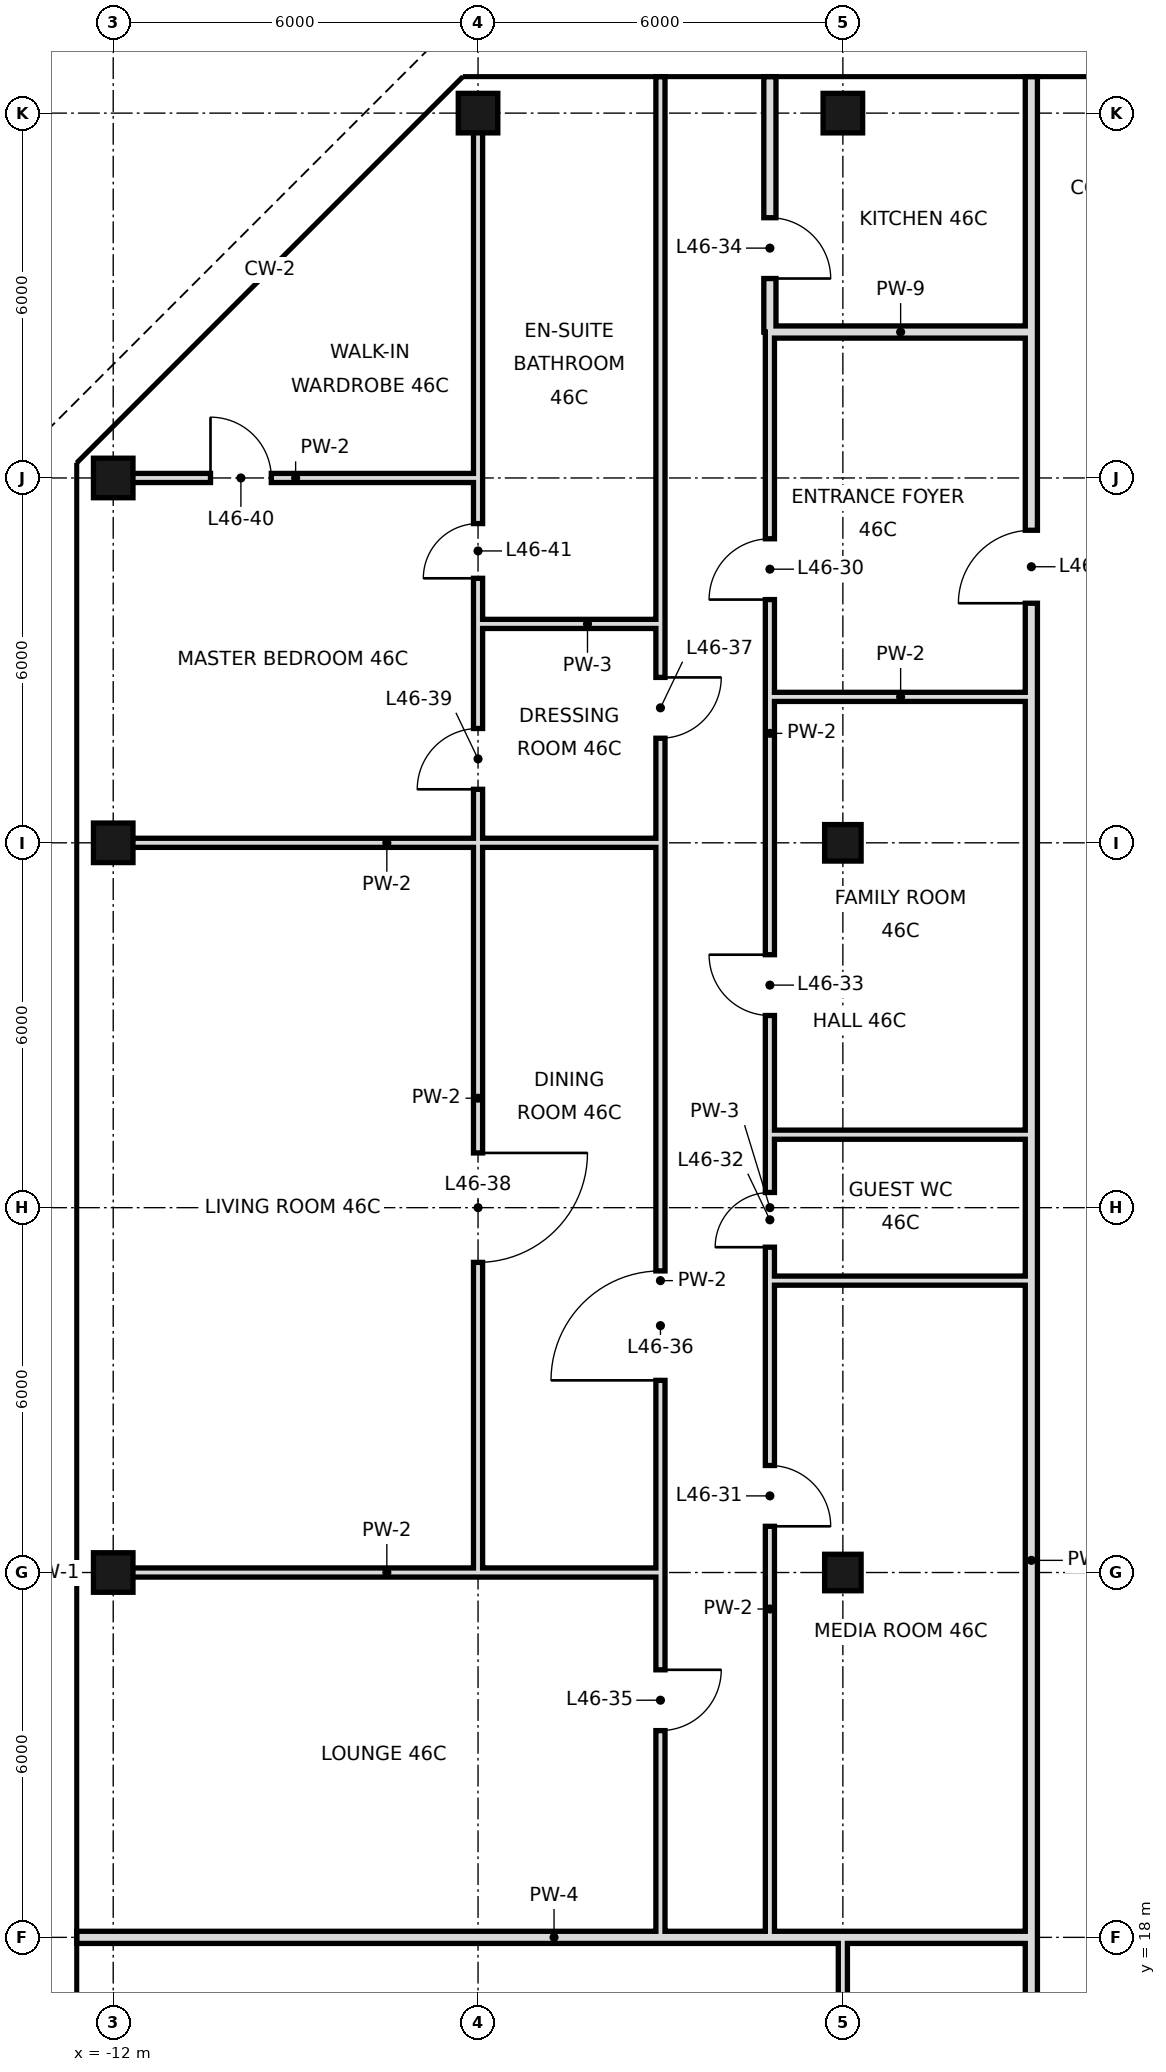
"""IFC4 building model, lengths in metres.
Left out: names, types, materials, properties, quantities, classifications, styles, units other than length and angle.
Written with IfcOpenShell. Run it as: python <this file> out.ifc"""

import sys

from ifc_helpers import new_model, si_unit, direction, frame, frame_2d, origin, origin_2d, place, context, subcontext, project, spatial, rectangle, hollow_rectangle, extrude, element, fill, save


model = new_model("IFC4")
c1 = context("Model", 3, precision=1e-05, world=origin(), true_north=direction((0.0, 1.0)))
c2 = subcontext(c1, "Body", "Model", "MODEL_VIEW")
j1 = project(units=[si_unit("LENGTHUNIT", "METRE"), si_unit("PLANEANGLEUNIT", "RADIAN")], contexts=[c1])
p1 = place(None, origin())
s1 = spatial("IfcSite", under=j1, at=p1, CompositionType="ELEMENT")
p2 = place(p1, origin())
s2 = spatial("IfcBuilding", under=s1, at=p2, CompositionType="ELEMENT")
p3 = place(p2, frame((0.0, 0.0, 199.2)))
s3 = spatial("IfcBuildingStorey", under=s2, at=p3, CompositionType="ELEMENT", Elevation=199.2)
for number, where, z_axis, x_axis in (
    (1, (-12.0, 24.0, 0.0), (0.0, 0.0, 1.0), (1.0, 0.0, 0.0)),
    (2, (-12.0, 36.0, 0.0), (0.0, 0.0, 1.0), (1.0, 0.0, 0.0)),
    (3, (-12.0, 42.0, 0.0), (0.0, 0.0, 1.0), (1.0, 0.0, 0.0)),
    (4, (-6.0, 48.0, 0.0), (0.0, 0.0, 1.0), (1.0, 0.0, 0.0)),
):
    element("IfcColumn", number, at=place(p3, frame(where, z_axis=z_axis, x_axis=x_axis)), inside=s3, PredefinedType="COLUMN", context=c2, shape_type="SweptSolid", body=[
        extrude(hollow_rectangle(XDim=0.65, YDim=0.65, WallThickness=0.032, at=origin_2d()), origin(), (0.0, 0.0, 1.0), 3.6),
    ])
for number, where, z_axis, x_axis in (
    (5, (0.0, 24.0, 0.0), (0.0, 0.0, 1.0), (1.0, 0.0, 0.0)),
    (6, (0.0, 36.0, 0.0), (0.0, 0.0, 1.0), (1.0, 0.0, 0.0)),
):
    element("IfcColumn", number, at=place(p3, frame(where, z_axis=z_axis, x_axis=x_axis)), inside=s3, PredefinedType="COLUMN", context=c2, shape_type="SweptSolid", body=[
        extrude(hollow_rectangle(XDim=0.6, YDim=0.6, WallThickness=0.028, at=origin_2d()), origin(), (0.0, 0.0, 1.0), 3.6),
    ])
p4 = place(p3, frame((0.0, 48.0, 0.0), z_axis=(0.0, 0.0, 1.0), x_axis=(1.0, 0.0, 0.0)))
e7 = element("IfcColumn", 7, at=p4, inside=s3, PredefinedType="COLUMN", context=c2, shape_type="SweptSolid", body=[
    extrude(hollow_rectangle(XDim=0.65, YDim=0.65, WallThickness=0.032, at=origin_2d()), origin(), (0.0, 0.0, 1.0), 3.6),
])
p5 = place(p3, frame((-1.2, 44.4, 0.0), z_axis=(0.0, 0.0, 1.0), x_axis=(0.0, 1.0, 0.0)))
e8 = element("IfcWall", 8, at=p5, inside=s3, PredefinedType="SOLIDWALL", context=c2, shape_type="SweptSolid", body=[
    extrude(rectangle(XDim=4.2, YDim=0.2, at=frame_2d((2.1, 0.0))), origin(), (0.0, 0.0, 1.0), 2.97),
])
p6 = place(p5, frame((0.88, 0.0, 0.0)))
e9 = element("IfcOpeningElement", 9, at=p6, cuts=e8, PredefinedType="OPENING", context=c2, shape_type="SweptSolid", body=[
    extrude(rectangle(XDim=1.0, YDim=2.4, at=frame_2d((0.5, 1.2))), frame((0.0, 0.11, 0.0), z_axis=(0.0, -1.0, 0.0), x_axis=(1.0, 0.0, 0.0)), (0.0, 0.0, 1.0), 0.22),
])
p7 = place(p3, frame((-1.2, 18.0, 0.0), z_axis=(0.0, 0.0, 1.0), x_axis=(0.0, 1.0, 0.0)))
e10 = element("IfcWall", 10, at=p7, inside=s3, PredefinedType="PARTITIONING", context=c2, shape_type="SweptSolid", body=[
    extrude(rectangle(XDim=10.8, YDim=0.15, at=frame_2d((5.4, 0.0))), origin(), (0.0, 0.0, 1.0), 3.42),
])
p8 = place(p7, frame((6.76, 0.0, 0.0)))
e11 = element("IfcOpeningElement", 11, at=p8, cuts=e10, PredefinedType="OPENING", context=c2, shape_type="SweptSolid", body=[
    extrude(rectangle(XDim=1.0, YDim=2.4, at=frame_2d((0.5, 1.2))), frame((0.0, 0.085, 0.0), z_axis=(0.0, -1.0, 0.0), x_axis=(1.0, 0.0, 0.0)), (0.0, 0.0, 1.0), 0.17),
])
p9 = place(p3, frame((-1.2, 31.2, 0.0), z_axis=(0.0, 0.0, 1.0), x_axis=(0.0, 1.0, 0.0)))
e12 = element("IfcWall", 12, at=p9, inside=s3, PredefinedType="PARTITIONING", context=c2, shape_type="SweptSolid", body=[
    extrude(rectangle(XDim=13.2, YDim=0.15, at=frame_2d((6.6, 0.0))), origin(), (0.0, 0.0, 1.0), 3.42),
])
p10 = place(p9, frame((8.8, 0.0, 0.0)))
e13 = element("IfcOpeningElement", 13, at=p10, cuts=e12, PredefinedType="OPENING", context=c2, shape_type="SweptSolid", body=[
    extrude(rectangle(XDim=1.0, YDim=2.4, at=frame_2d((0.5, 1.2))), frame((0.0, 0.085, 0.0), z_axis=(0.0, -1.0, 0.0), x_axis=(1.0, 0.0, 0.0)), (0.0, 0.0, 1.0), 0.17),
])
p11 = place(p9, frame((1.96, 0.0, 0.0)))
e14 = element("IfcOpeningElement", 14, at=p11, cuts=e12, PredefinedType="OPENING", context=c2, shape_type="SweptSolid", body=[
    extrude(rectangle(XDim=1.0, YDim=2.4, at=frame_2d((0.5, 1.2))), frame((0.0, 0.085, 0.0), z_axis=(0.0, -1.0, 0.0), x_axis=(1.0, 0.0, 0.0)), (0.0, 0.0, 1.0), 0.17),
])
p12 = place(p3, frame((-1.2, 28.8, 0.0), z_axis=(0.0, 0.0, 1.0), x_axis=(0.0, 1.0, 0.0)))
e15 = element("IfcWall", 15, at=p12, inside=s3, PredefinedType="PARTITIONING", context=c2, shape_type="SweptSolid", body=[
    extrude(rectangle(XDim=2.4, YDim=0.15, at=frame_2d((1.2, 0.0))), origin(), (0.0, 0.0, 1.0), 3.42),
])
p13 = place(p12, frame((0.55, 0.0, 0.0)))
e16 = element("IfcOpeningElement", 16, at=p13, cuts=e15, PredefinedType="OPENING", context=c2, shape_type="SweptSolid", body=[
    extrude(rectangle(XDim=0.9, YDim=2.4, at=frame_2d((0.45, 1.2))), frame((0.0, 0.085, 0.0), z_axis=(0.0, -1.0, 0.0), x_axis=(1.0, 0.0, 0.0)), (0.0, 0.0, 1.0), 0.17),
])
p14 = place(p3, frame((-3.0, 18.0, 0.0), z_axis=(0.0, 0.0, 1.0), x_axis=(0.0, 1.0, 0.0)))
e17 = element("IfcWall", 17, at=p14, inside=s3, PredefinedType="PARTITIONING", context=c2, shape_type="SweptSolid", body=[
    extrude(rectangle(XDim=21.6, YDim=0.15, at=frame_2d((10.8, 0.0))), origin(), (0.0, 0.0, 1.0), 3.42),
])
p15 = place(p14, frame((3.4, 0.0, 0.0)))
e18 = element("IfcOpeningElement", 18, at=p15, cuts=e17, PredefinedType="OPENING", context=c2, shape_type="SweptSolid", body=[
    extrude(rectangle(XDim=1.0, YDim=2.4, at=frame_2d((0.5, 1.2))), frame((0.0, 0.085, 0.0), z_axis=(0.0, -1.0, 0.0), x_axis=(1.0, 0.0, 0.0)), (0.0, 0.0, 1.0), 0.17),
])
p16 = place(p14, frame((9.16, 0.0, 0.0)))
e19 = element("IfcOpeningElement", 19, at=p16, cuts=e17, PredefinedType="OPENING", context=c2, shape_type="SweptSolid", body=[
    extrude(rectangle(XDim=1.8, YDim=2.4, at=frame_2d((0.9, 1.2))), frame((0.0, 0.085, 0.0), z_axis=(0.0, -1.0, 0.0), x_axis=(1.0, 0.0, 0.0)), (0.0, 0.0, 1.0), 0.17),
])
p17 = place(p14, frame((19.72, 0.0, 0.0)))
e20 = element("IfcOpeningElement", 20, at=p17, cuts=e17, PredefinedType="OPENING", context=c2, shape_type="SweptSolid", body=[
    extrude(rectangle(XDim=1.0, YDim=2.4, at=frame_2d((0.5, 1.2))), frame((0.0, 0.085, 0.0), z_axis=(0.0, -1.0, 0.0), x_axis=(1.0, 0.0, 0.0)), (0.0, 0.0, 1.0), 0.17),
])
p18 = place(p3, frame((-3.0, 39.6, 0.0), z_axis=(0.0, 0.0, 1.0), x_axis=(0.0, 1.0, 0.0)))
e21 = element("IfcWall", 21, at=p18, inside=s3, PredefinedType="PARTITIONING", context=c2, shape_type="SweptSolid", body=[
    extrude(rectangle(XDim=9.0, YDim=0.15, at=frame_2d((4.5, 0.0))), origin(), (0.0, 0.0, 1.0), 3.42),
])
p19 = place(p3, frame((-6.0, 24.0, 0.0), z_axis=(0.0, 0.0, 1.0), x_axis=(0.0, 1.0, 0.0)))
e22 = element("IfcWall", 22, at=p19, inside=s3, PredefinedType="PARTITIONING", context=c2, shape_type="SweptSolid", body=[
    extrude(rectangle(XDim=15.6, YDim=0.15, at=frame_2d((7.8, 0.0))), origin(), (0.0, 0.0, 1.0), 3.42),
])
p20 = place(p19, frame((5.1, 0.0, 0.0)))
e23 = element("IfcOpeningElement", 23, at=p20, cuts=e22, PredefinedType="OPENING", context=c2, shape_type="SweptSolid", body=[
    extrude(rectangle(XDim=1.8, YDim=2.4, at=frame_2d((0.9, 1.2))), frame((0.0, 0.085, 0.0), z_axis=(0.0, -1.0, 0.0), x_axis=(1.0, 0.0, 0.0)), (0.0, 0.0, 1.0), 0.17),
])
p21 = place(p19, frame((12.88, 0.0, 0.0)))
e24 = element("IfcOpeningElement", 24, at=p21, cuts=e22, PredefinedType="OPENING", context=c2, shape_type="SweptSolid", body=[
    extrude(rectangle(XDim=1.0, YDim=2.4, at=frame_2d((0.5, 1.2))), frame((0.0, 0.085, 0.0), z_axis=(0.0, -1.0, 0.0), x_axis=(1.0, 0.0, 0.0)), (0.0, 0.0, 1.0), 0.17),
])
p22 = place(p3, frame((-6.0, 39.6, 0.0), z_axis=(0.0, 0.0, 1.0), x_axis=(0.0, 1.0, 0.0)))
e25 = element("IfcWall", 25, at=p22, inside=s3, PredefinedType="PARTITIONING", context=c2, shape_type="SweptSolid", body=[
    extrude(rectangle(XDim=8.4, YDim=0.15, at=frame_2d((4.2, 0.0))), origin(), (0.0, 0.0, 1.0), 3.42),
])
p23 = place(p22, frame((0.75, 0.0, 0.0)))
e26 = element("IfcOpeningElement", 26, at=p23, cuts=e25, PredefinedType="OPENING", context=c2, shape_type="SweptSolid", body=[
    extrude(rectangle(XDim=0.9, YDim=2.4, at=frame_2d((0.45, 1.2))), frame((0.0, 0.085, 0.0), z_axis=(0.0, -1.0, 0.0), x_axis=(1.0, 0.0, 0.0)), (0.0, 0.0, 1.0), 0.17),
])
p24 = place(p3, frame((0.0, 10.8, 0.0), z_axis=(0.0, 0.0, 1.0), x_axis=(0.0, 1.0, 0.0)))
e27 = element("IfcWall", 27, at=p24, inside=s3, PredefinedType="PARTITIONING", context=c2, shape_type="SweptSolid", body=[
    extrude(rectangle(XDim=7.2, YDim=0.15, at=frame_2d((3.6, 0.0))), origin(), (0.0, 0.0, 1.0), 2.72),
])
p25 = place(p3, frame((3.1, 15.3, 0.0), z_axis=(0.0, 0.0, 1.0), x_axis=(0.0, 1.0, 0.0)))
e28 = element("IfcWall", 28, at=p25, inside=s3, PredefinedType="SOLIDWALL", context=c2, shape_type="SweptSolid", body=[
    extrude(rectangle(XDim=29.1, YDim=0.2, at=frame_2d((14.55, 0.0))), origin(), (0.0, 0.0, 1.0), 2.97),
])
p26 = place(p25, frame((24.64, 0.0, 0.0)))
e29 = element("IfcOpeningElement", 29, at=p26, cuts=e28, PredefinedType="OPENING", context=c2, shape_type="SweptSolid", body=[
    extrude(rectangle(XDim=1.2, YDim=2.4, at=frame_2d((0.6, 1.2))), frame((0.0, 0.11, 0.0), z_axis=(0.0, -1.0, 0.0), x_axis=(1.0, 0.0, 0.0)), (0.0, 0.0, 1.0), 0.22),
])
p27 = place(p3, frame((3.1, 44.4, 0.0), z_axis=(0.0, 0.0, 1.0), x_axis=(0.0, 1.0, 0.0)))
e30 = element("IfcWall", 30, at=p27, inside=s3, PredefinedType="SOLIDWALL", context=c2, shape_type="SweptSolid", body=[
    extrude(rectangle(XDim=4.2, YDim=0.2, at=frame_2d((2.1, 0.0))), origin(), (0.0, 0.0, 1.0), 2.72),
])
p28 = place(p3, frame((-12.6, 18.0, 0.0), z_axis=(0.0, 0.0, 1.0), x_axis=(1.0, 0.0, 0.0)))
e31 = element("IfcWall", 31, at=p28, inside=s3, PredefinedType="SOLIDWALL", context=c2, shape_type="SweptSolid", body=[
    extrude(rectangle(XDim=15.7, YDim=0.2, at=frame_2d((7.85, 0.0))), origin(), (0.0, 0.0, 1.0), 2.72),
])
p29 = place(p3, frame((-12.0, 24.0, 0.0), z_axis=(0.0, 0.0, 1.0), x_axis=(1.0, 0.0, 0.0)))
e32 = element("IfcWall", 32, at=p29, inside=s3, PredefinedType="PARTITIONING", context=c2, shape_type="SweptSolid", body=[
    extrude(rectangle(XDim=9.0, YDim=0.15, at=frame_2d((4.5, 0.0))), origin(), (0.0, 0.0, 1.0), 2.72),
])
for number, where, z_axis, x_axis in (
    (33, (-1.2, 28.8, 0.0), (0.0, 0.0, 1.0), (1.0, 0.0, 0.0)),
    (34, (-1.2, 31.2, 0.0), (0.0, 0.0, 1.0), (1.0, 0.0, 0.0)),
):
    element("IfcWall", number, at=place(p3, frame(where, z_axis=z_axis, x_axis=x_axis)), inside=s3, PredefinedType="PARTITIONING", context=c2, shape_type="SweptSolid", body=[
        extrude(rectangle(XDim=4.3, YDim=0.15, at=frame_2d((2.15, 0.0))), origin(), (0.0, 0.0, 1.0), 3.42),
    ])
p30 = place(p3, frame((-12.0, 36.0, 0.0), z_axis=(0.0, 0.0, 1.0), x_axis=(1.0, 0.0, 0.0)))
e35 = element("IfcWall", 35, at=p30, inside=s3, PredefinedType="PARTITIONING", context=c2, shape_type="SweptSolid", body=[
    extrude(rectangle(XDim=9.0, YDim=0.15, at=frame_2d((4.5, 0.0))), origin(), (0.0, 0.0, 1.0), 2.72),
])
p31 = place(p3, frame((-1.2, 38.4, 0.0), z_axis=(0.0, 0.0, 1.0), x_axis=(1.0, 0.0, 0.0)))
e36 = element("IfcWall", 36, at=p31, inside=s3, PredefinedType="PARTITIONING", context=c2, shape_type="SweptSolid", body=[
    extrude(rectangle(XDim=4.3, YDim=0.15, at=frame_2d((2.15, 0.0))), origin(), (0.0, 0.0, 1.0), 3.42),
])
p32 = place(p3, frame((-6.0, 39.6, 0.0), z_axis=(0.0, 0.0, 1.0), x_axis=(1.0, 0.0, 0.0)))
e37 = element("IfcWall", 37, at=p32, inside=s3, PredefinedType="PARTITIONING", context=c2, shape_type="SweptSolid", body=[
    extrude(rectangle(XDim=3.0, YDim=0.15, at=frame_2d((1.5, 0.0))), origin(), (0.0, 0.0, 1.0), 3.42),
])
p33 = place(p3, frame((-12.0, 42.0, 0.0), z_axis=(0.0, 0.0, 1.0), x_axis=(1.0, 0.0, 0.0)))
e38 = element("IfcWall", 38, at=p33, inside=s3, PredefinedType="PARTITIONING", context=c2, shape_type="SweptSolid", body=[
    extrude(rectangle(XDim=6.0, YDim=0.15, at=frame_2d((3.0, 0.0))), origin(), (0.0, 0.0, 1.0), 2.72),
])
p34 = place(p33, frame((1.6, 0.0, 0.0)))
e39 = element("IfcOpeningElement", 39, at=p34, cuts=e38, PredefinedType="OPENING", context=c2, shape_type="SweptSolid", body=[
    extrude(rectangle(XDim=1.0, YDim=2.4, at=frame_2d((0.5, 1.2))), frame((0.0, 0.085, 0.0), z_axis=(0.0, -1.0, 0.0), x_axis=(1.0, 0.0, 0.0)), (0.0, 0.0, 1.0), 0.17),
])
p35 = place(p3, frame((-1.2, 44.4, 0.0), z_axis=(0.0, 0.0, 1.0), x_axis=(1.0, 0.0, 0.0)))
e40 = element("IfcWall", 40, at=p35, inside=s3, PredefinedType="SOLIDWALL", context=c2, shape_type="SweptSolid", body=[
    extrude(rectangle(XDim=4.3, YDim=0.2, at=frame_2d((2.15, 0.0))), origin(), (0.0, 0.0, 1.0), 2.72),
])
p36 = place(p10, origin())
e41 = element("IfcDoor", 41, at=p36, inside=s3, OperationType="SINGLE_SWING_LEFT", PredefinedType="DOOR", context=c2, shape_type="SweptSolid", body=[
    extrude(rectangle(XDim=1.0, YDim=2.4, at=frame_2d((0.5, 1.2))), frame((0.0, 0.025, 0.0), z_axis=(0.0, -1.0, 0.0), x_axis=(1.0, 0.0, 0.0)), (0.0, 0.0, 1.0), 0.05),
])
fill(e13, e41)
p37 = place(p8, frame((1.0, 0.0, 0.0), z_axis=(0.0, 0.0, 1.0), x_axis=(-1.0, 0.0, 0.0)))
e42 = element("IfcDoor", 42, at=p37, inside=s3, OperationType="SINGLE_SWING_RIGHT", PredefinedType="DOOR", context=c2, shape_type="SweptSolid", body=[
    extrude(rectangle(XDim=1.0, YDim=2.4, at=frame_2d((0.5, 1.2))), frame((0.0, 0.025, 0.0), z_axis=(0.0, -1.0, 0.0), x_axis=(1.0, 0.0, 0.0)), (0.0, 0.0, 1.0), 0.05),
])
fill(e11, e42)
p38 = place(p13, origin())
e43 = element("IfcDoor", 43, at=p38, inside=s3, OperationType="SINGLE_SWING_LEFT", PredefinedType="DOOR", context=c2, shape_type="SweptSolid", body=[
    extrude(rectangle(XDim=0.9, YDim=2.4, at=frame_2d((0.45, 1.2))), frame((0.0, 0.025, 0.0), z_axis=(0.0, -1.0, 0.0), x_axis=(1.0, 0.0, 0.0)), (0.0, 0.0, 1.0), 0.05),
])
fill(e16, e43)
p39 = place(p11, frame((1.0, 0.0, 0.0), z_axis=(0.0, 0.0, 1.0), x_axis=(-1.0, 0.0, 0.0)))
e44 = element("IfcDoor", 44, at=p39, inside=s3, OperationType="SINGLE_SWING_LEFT", PredefinedType="DOOR", context=c2, shape_type="SweptSolid", body=[
    extrude(rectangle(XDim=1.0, YDim=2.4, at=frame_2d((0.5, 1.2))), frame((0.0, 0.025, 0.0), z_axis=(0.0, -1.0, 0.0), x_axis=(1.0, 0.0, 0.0)), (0.0, 0.0, 1.0), 0.05),
])
fill(e14, e44)
p40 = place(p6, frame((1.0, 0.0, 0.0), z_axis=(0.0, 0.0, 1.0), x_axis=(-1.0, 0.0, 0.0)))
e45 = element("IfcDoor", 45, at=p40, inside=s3, OperationType="SINGLE_SWING_RIGHT", PredefinedType="DOOR", context=c2, shape_type="SweptSolid", body=[
    extrude(rectangle(XDim=1.0, YDim=2.4, at=frame_2d((0.5, 1.2))), frame((0.0, 0.025, 0.0), z_axis=(0.0, -1.0, 0.0), x_axis=(1.0, 0.0, 0.0)), (0.0, 0.0, 1.0), 0.05),
])
fill(e9, e45)
p41 = place(p15, origin())
e46 = element("IfcDoor", 46, at=p41, inside=s3, OperationType="SINGLE_SWING_RIGHT", PredefinedType="DOOR", context=c2, shape_type="SweptSolid", body=[
    extrude(rectangle(XDim=1.0, YDim=2.4, at=frame_2d((0.5, 1.2))), frame((0.0, 0.025, 0.0), z_axis=(0.0, -1.0, 0.0), x_axis=(1.0, 0.0, 0.0)), (0.0, 0.0, 1.0), 0.05),
])
fill(e18, e46)
p42 = place(p16, origin())
e47 = element("IfcDoor", 47, at=p42, inside=s3, OperationType="SINGLE_SWING_LEFT", PredefinedType="DOOR", context=c2, shape_type="SweptSolid", body=[
    extrude(rectangle(XDim=1.8, YDim=2.4, at=frame_2d((0.9, 1.2))), frame((0.0, 0.025, 0.0), z_axis=(0.0, -1.0, 0.0), x_axis=(1.0, 0.0, 0.0)), (0.0, 0.0, 1.0), 0.05),
])
fill(e19, e47)
p43 = place(p17, origin())
e48 = element("IfcDoor", 48, at=p43, inside=s3, OperationType="SINGLE_SWING_RIGHT", PredefinedType="DOOR", context=c2, shape_type="SweptSolid", body=[
    extrude(rectangle(XDim=1.0, YDim=2.4, at=frame_2d((0.5, 1.2))), frame((0.0, 0.025, 0.0), z_axis=(0.0, -1.0, 0.0), x_axis=(1.0, 0.0, 0.0)), (0.0, 0.0, 1.0), 0.05),
])
fill(e20, e48)
p44 = place(p20, origin())
e49 = element("IfcDoor", 49, at=p44, inside=s3, OperationType="SINGLE_SWING_RIGHT", PredefinedType="DOOR", context=c2, shape_type="SweptSolid", body=[
    extrude(rectangle(XDim=1.8, YDim=2.4, at=frame_2d((0.9, 1.2))), frame((0.0, 0.025, 0.0), z_axis=(0.0, -1.0, 0.0), x_axis=(1.0, 0.0, 0.0)), (0.0, 0.0, 1.0), 0.05),
])
fill(e23, e49)
p45 = place(p21, origin())
e50 = element("IfcDoor", 50, at=p45, inside=s3, OperationType="SINGLE_SWING_LEFT", PredefinedType="DOOR", context=c2, shape_type="SweptSolid", body=[
    extrude(rectangle(XDim=1.0, YDim=2.4, at=frame_2d((0.5, 1.2))), frame((0.0, 0.025, 0.0), z_axis=(0.0, -1.0, 0.0), x_axis=(1.0, 0.0, 0.0)), (0.0, 0.0, 1.0), 0.05),
])
fill(e24, e50)
p46 = place(p34, origin())
e51 = element("IfcDoor", 51, at=p46, inside=s3, OperationType="SINGLE_SWING_LEFT", PredefinedType="DOOR", context=c2, shape_type="SweptSolid", body=[
    extrude(rectangle(XDim=1.0, YDim=2.4, at=frame_2d((0.5, 1.2))), frame((0.0, 0.025, 0.0), z_axis=(0.0, -1.0, 0.0), x_axis=(1.0, 0.0, 0.0)), (0.0, 0.0, 1.0), 0.05),
])
fill(e39, e51)
p47 = place(p23, origin())
e52 = element("IfcDoor", 52, at=p47, inside=s3, OperationType="SINGLE_SWING_LEFT", PredefinedType="DOOR", context=c2, shape_type="SweptSolid", body=[
    extrude(rectangle(XDim=0.9, YDim=2.4, at=frame_2d((0.45, 1.2))), frame((0.0, 0.025, 0.0), z_axis=(0.0, -1.0, 0.0), x_axis=(1.0, 0.0, 0.0)), (0.0, 0.0, 1.0), 0.05),
])
fill(e26, e52)
p48 = place(p26, origin())
e53 = element("IfcDoor", 53, at=p48, inside=s3, OperationType="SINGLE_SWING_LEFT", PredefinedType="DOOR", context=c2, shape_type="SweptSolid", body=[
    extrude(rectangle(XDim=1.2, YDim=2.4, at=frame_2d((0.6, 1.2))), frame((0.0, 0.025, 0.0), z_axis=(0.0, -1.0, 0.0), x_axis=(1.0, 0.0, 0.0)), (0.0, 0.0, 1.0), 0.05),
])
fill(e29, e53)
save(model, sys.argv[1])
